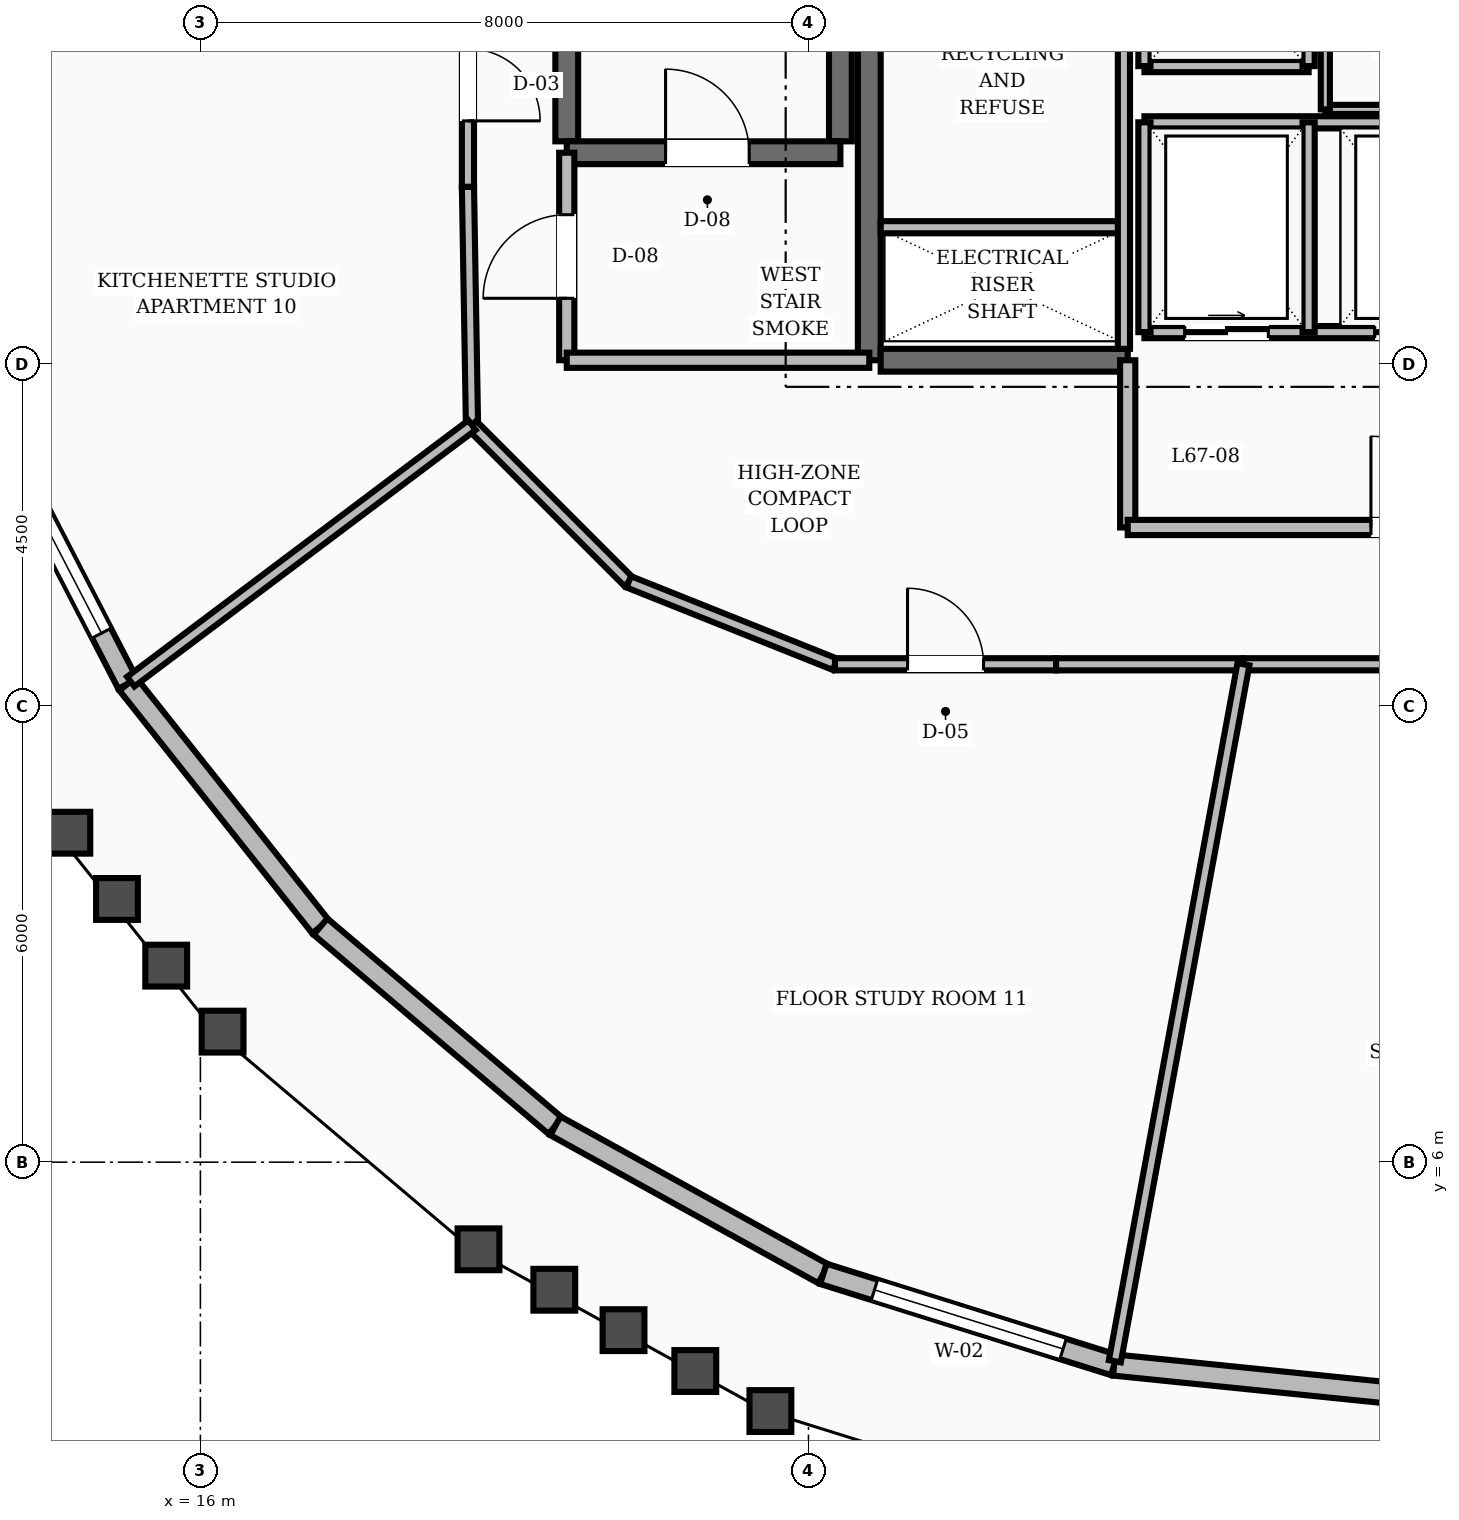
"""IFC4 building model, lengths in metres.
Left out: names, types, materials, properties, quantities, classifications, styles, units other than length and angle.
Written with IfcOpenShell. Run it as: python <this file> out.ifc"""

import sys

from ifc_helpers import new_model, si_unit, direction, frame, frame_2d, origin, place, context, subcontext, project, spatial, rectangle, extrude, element, fill, save


model = new_model("IFC4")
c1 = context("Model", 3, precision=1e-05, world=origin(), true_north=direction((0.0, 1.0)))
c2 = subcontext(c1, "Body", "Model", "MODEL_VIEW")
j1 = project(units=[si_unit("LENGTHUNIT", "METRE"), si_unit("PLANEANGLEUNIT", "RADIAN")], contexts=[c1])
p1 = place(None, origin())
s1 = spatial("IfcSite", under=j1, at=p1, CompositionType="ELEMENT")
p2 = place(p1, origin())
s2 = spatial("IfcBuilding", under=s1, at=p2, CompositionType="ELEMENT")
p3 = place(p2, frame((0.0, 0.0, 258.0)))
s3 = spatial("IfcBuildingStorey", under=s2, at=p3, CompositionType="ELEMENT", Elevation=258.0)
p4 = place(p3, frame((24.8, 16.55, 0.0), z_axis=(0.0, 0.0, 1.0), x_axis=(0.0, 1.0, 0.0)))
e1 = element("IfcWall", 1, at=p4, inside=s3, PredefinedType="SHEAR", context=c2, shape_type="SweptSolid", body=[
    extrude(rectangle(XDim=6.3, YDim=0.3, at=frame_2d((3.15, 0.0))), origin(), (0.0, 0.0, 1.0), 3.6),
])
p5 = place(p3, frame((24.95, 16.55, 0.0), z_axis=(0.0, 0.0, 1.0), x_axis=(1.0, 0.0, 0.0)))
e2 = element("IfcWall", 2, at=p5, inside=s3, PredefinedType="SHEAR", context=c2, shape_type="SweptSolid", body=[
    extrude(rectangle(XDim=3.25, YDim=0.3, at=frame_2d((1.625, 0.0))), origin(), (0.0, 0.0, 1.0), 3.6),
])
for number, where, z_axis, x_axis in (
    (3, (20.82, 19.43, 0.0), (0.0, 0.0, 1.0), (0.0, 1.0, 0.0)),
    (4, (24.42, 19.43, 0.0), (0.0, 0.0, 1.0), (0.0, 1.0, 0.0)),
):
    element("IfcWall", number, at=place(p3, frame(where, z_axis=z_axis, x_axis=x_axis)), inside=s3, PredefinedType="SHEAR", context=c2, shape_type="SweptSolid", body=[
        extrude(rectangle(XDim=8.74, YDim=0.3, at=frame_2d((4.37, 0.0))), origin(), (0.0, 0.0, 1.0), 3.6),
    ])
p6 = place(p3, frame((20.82, 19.28, 0.0), z_axis=(0.0, 0.0, 1.0), x_axis=(1.0, 0.0, 0.0)))
e5 = element("IfcWall", 5, at=p6, inside=s3, PredefinedType="SHEAR", context=c2, shape_type="SweptSolid", body=[
    extrude(rectangle(XDim=3.6, YDim=0.3, at=frame_2d((1.8, 0.0))), origin(), (0.0, 0.0, 1.0), 3.6),
])
p7 = place(p6, frame((1.3, 0.0, 0.0)))
e6 = element("IfcOpeningElement", 6, at=p7, cuts=e5, PredefinedType="OPENING", context=c2, shape_type="SweptSolid", body=[
    extrude(rectangle(XDim=1.1, YDim=2.1, at=frame_2d((0.55, 1.05))), frame((0.0, 0.16, 0.0), z_axis=(0.0, -1.0, 0.0), x_axis=(1.0, 0.0, 0.0)), (0.0, 0.0, 1.0), 0.32),
])
p8 = place(p3, frame((13.159, 15.936, 0.0), z_axis=(0.0, 0.0, 1.0), x_axis=(0.459432634071, -0.888212617987, 0.0)))
e7 = element("IfcWall", 7, at=p8, inside=s3, PredefinedType="STANDARD", context=c2, shape_type="SweptSolid", body=[
    extrude(rectangle(XDim=4.102, YDim=0.28, at=frame_2d((2.051, 0.0))), origin(), (0.0, 0.0, 1.0), 2.88),
])
p9 = place(p8, frame((0.751, 0.0, 0.8)))
e8 = element("IfcOpeningElement", 8, at=p9, cuts=e7, PredefinedType="OPENING", context=c2, shape_type="SweptSolid", body=[
    extrude(rectangle(XDim=2.6, YDim=1.65, at=frame_2d((1.3, 0.825))), frame((0.0, 0.15, 0.0), z_axis=(0.0, -1.0, 0.0), x_axis=(1.0, 0.0, 0.0)), (0.0, 0.0, 1.0), 0.3),
])
p10 = place(p3, frame((15.044, 12.292, 0.0), z_axis=(0.0, 0.0, 1.0), x_axis=(0.621916698547, -0.783083405563, 0.0)))
e9 = element("IfcWall", 9, at=p10, inside=s3, PredefinedType="STANDARD", context=c2, shape_type="SweptSolid", body=[
    extrude(rectangle(XDim=4.078, YDim=0.28, at=frame_2d((2.039, 0.0))), origin(), (0.0, 0.0, 1.0), 2.88),
])
p11 = place(p3, frame((17.58, 9.099, 0.0), z_axis=(0.0, 0.0, 1.0), x_axis=(0.762691056528, -0.646762979995, 0.0)))
e10 = element("IfcWall", 10, at=p11, inside=s3, PredefinedType="STANDARD", context=c2, shape_type="SweptSolid", body=[
    extrude(rectangle(XDim=4.052, YDim=0.28, at=frame_2d((2.026, 0.0))), origin(), (0.0, 0.0, 1.0), 2.88),
])
p12 = place(p3, frame((20.67, 6.478, 0.0), z_axis=(0.0, 0.0, 1.0), x_axis=(0.875332682679, -0.483521141869, 0.0)))
e11 = element("IfcWall", 11, at=p12, inside=s3, PredefinedType="STANDARD", context=c2, shape_type="SweptSolid", body=[
    extrude(rectangle(XDim=4.028, YDim=0.28, at=frame_2d((2.014, 0.0))), origin(), (0.0, 0.0, 1.0), 2.88),
])
p13 = place(p3, frame((24.196, 4.531, 0.0), z_axis=(0.0, 0.0, 1.0), x_axis=(0.954211945644, -0.299131347055, 0.0)))
e12 = element("IfcWall", 12, at=p13, inside=s3, PredefinedType="STANDARD", context=c2, shape_type="SweptSolid", body=[
    extrude(rectangle(XDim=4.009, YDim=0.28, at=frame_2d((2.004, 0.0))), origin(), (0.0, 0.0, 1.0), 2.88),
])
p14 = place(p13, frame((0.705, 0.0, 0.8)))
e13 = element("IfcOpeningElement", 13, at=p14, cuts=e12, PredefinedType="OPENING", context=c2, shape_type="SweptSolid", body=[
    extrude(rectangle(XDim=2.6, YDim=1.65, at=frame_2d((1.3, 0.825))), frame((0.0, 0.15, 0.0), z_axis=(0.0, -1.0, 0.0), x_axis=(1.0, 0.0, 0.0)), (0.0, 0.0, 1.0), 0.3),
])
p15 = place(p3, frame((28.021, 3.332, 0.0), z_axis=(0.0, 0.0, 1.0), x_axis=(0.99486404525, -0.101220212753, 0.0)))
e14 = element("IfcWall", 14, at=p15, inside=s3, PredefinedType="STANDARD", context=c2, shape_type="SweptSolid", body=[
    extrude(rectangle(XDim=3.999, YDim=0.28, at=frame_2d((2.0, 0.0))), origin(), (0.0, 0.0, 1.0), 2.88),
])
p16 = place(p3, frame((20.82, 16.55, 0.0), z_axis=(0.0, 0.0, 1.0), x_axis=(0.0, 1.0, 0.0)))
e15 = element("IfcWall", 15, at=p16, inside=s3, PredefinedType="SOLIDWALL", context=c2, shape_type="SweptSolid", body=[
    extrude(rectangle(XDim=2.73, YDim=0.2, at=frame_2d((1.365, 0.0))), origin(), (0.0, 0.0, 1.0), 2.87),
])
p17 = place(p16, frame((0.815, 0.0, 0.0)))
e16 = element("IfcOpeningElement", 16, at=p17, cuts=e15, PredefinedType="OPENING", context=c2, shape_type="SweptSolid", body=[
    extrude(rectangle(XDim=1.1, YDim=2.1, at=frame_2d((0.55, 1.05))), frame((0.0, 0.11, 0.0), z_axis=(0.0, -1.0, 0.0), x_axis=(1.0, 0.0, 0.0)), (0.0, 0.0, 1.0), 0.22),
])
p18 = place(p3, frame((20.82, 16.55, 0.0), z_axis=(0.0, 0.0, 1.0), x_axis=(1.0, 0.0, 0.0)))
e17 = element("IfcWall", 17, at=p18, inside=s3, PredefinedType="SOLIDWALL", context=c2, shape_type="SweptSolid", body=[
    extrude(rectangle(XDim=3.98, YDim=0.2, at=frame_2d((1.99, 0.0))), origin(), (0.0, 0.0, 1.0), 2.87),
])
p19 = place(p3, frame((28.2, 14.35, 0.0), z_axis=(0.0, 0.0, 1.0), x_axis=(0.0, 1.0, 0.0)))
e18 = element("IfcWall", 18, at=p19, inside=s3, PredefinedType="SOLIDWALL", context=c2, shape_type="SweptSolid", body=[
    extrude(rectangle(XDim=2.2, YDim=0.2, at=frame_2d((1.1, 0.0))), origin(), (0.0, 0.0, 1.0), 2.87),
])
p20 = place(p3, frame((28.2, 14.35, 0.0), z_axis=(0.0, 0.0, 1.0), x_axis=(1.0, 0.0, 0.0)))
e19 = element("IfcWall", 19, at=p20, inside=s3, PredefinedType="SOLIDWALL", context=c2, shape_type="SweptSolid", body=[
    extrude(rectangle(XDim=7.6, YDim=0.2, at=frame_2d((3.8, 0.0))), origin(), (0.0, 0.0, 1.0), 2.87),
])
p21 = place(p20, frame((3.2, 0.0, 0.0)))
e20 = element("IfcOpeningElement", 20, at=p21, cuts=e19, PredefinedType="OPENING", context=c2, shape_type="SweptSolid", body=[
    extrude(rectangle(XDim=1.2, YDim=2.1, at=frame_2d((0.6, 1.05))), frame((0.0, 0.11, 0.0), z_axis=(0.0, -1.0, 0.0), x_axis=(1.0, 0.0, 0.0)), (0.0, 0.0, 1.0), 0.22),
])
for number, where, z_axis, x_axis in (
    (21, (28.42, 20.42, 0.0), (0.0, 0.0, 1.0), (1.0, 0.0, 0.0)),
    (22, (28.42, 20.42, 0.0), (0.0, 0.0, 1.0), (0.0, 1.0, 0.0)),
    (23, (30.58, 20.42, 0.0), (0.0, 0.0, 1.0), (0.0, 1.0, 0.0)),
):
    element("IfcWall", number, at=place(p3, frame(where, z_axis=z_axis, x_axis=x_axis)), inside=s3, PredefinedType="SOLIDWALL", context=c2, shape_type="SweptSolid", body=[
        extrude(rectangle(XDim=2.16, YDim=0.16, at=frame_2d((1.08, 0.0))), origin(), (0.0, 0.0, 1.0), 2.87),
    ])
p22 = place(p3, frame((28.42, 16.92, 0.0), z_axis=(0.0, 0.0, 1.0), x_axis=(1.0, 0.0, 0.0)))
e24 = element("IfcWall", 24, at=p22, inside=s3, PredefinedType="SOLIDWALL", context=c2, shape_type="SweptSolid", body=[
    extrude(rectangle(XDim=7.16, YDim=0.16, at=frame_2d((3.58, 0.0))), origin(), (0.0, 0.0, 1.0), 2.87),
])
p23 = place(p22, frame((0.53, 0.0, 0.0)))
e25 = element("IfcOpeningElement", 25, at=p23, cuts=e24, PredefinedType="OPENING", context=c2, shape_type="SweptSolid", body=[
    extrude(rectangle(XDim=1.1, YDim=2.15, at=frame_2d((0.55, 1.075))), frame((0.0, 0.09, 0.0), z_axis=(0.0, -1.0, 0.0), x_axis=(1.0, 0.0, 0.0)), (0.0, 0.0, 1.0), 0.18),
])
p24 = place(p22, frame((3.03, 0.0, 0.0)))
e26 = element("IfcOpeningElement", 26, at=p24, cuts=e24, PredefinedType="OPENING", context=c2, shape_type="SweptSolid", body=[
    extrude(rectangle(XDim=1.1, YDim=2.15, at=frame_2d((0.55, 1.075))), frame((0.0, 0.09, 0.0), z_axis=(0.0, -1.0, 0.0), x_axis=(1.0, 0.0, 0.0)), (0.0, 0.0, 1.0), 0.18),
])
p25 = place(p22, frame((5.53, 0.0, 0.0)))
e27 = element("IfcOpeningElement", 27, at=p25, cuts=e24, PredefinedType="OPENING", context=c2, shape_type="SweptSolid", body=[
    extrude(rectangle(XDim=1.1, YDim=2.15, at=frame_2d((0.55, 1.075))), frame((0.0, 0.09, 0.0), z_axis=(0.0, -1.0, 0.0), x_axis=(1.0, 0.0, 0.0)), (0.0, 0.0, 1.0), 0.18),
])
p26 = place(p3, frame((28.42, 19.68, 0.0), z_axis=(0.0, 0.0, 1.0), x_axis=(1.0, 0.0, 0.0)))
e28 = element("IfcWall", 28, at=p26, inside=s3, PredefinedType="SOLIDWALL", context=c2, shape_type="SweptSolid", body=[
    extrude(rectangle(XDim=7.16, YDim=0.16, at=frame_2d((3.58, 0.0))), origin(), (0.0, 0.0, 1.0), 2.87),
])
for number, where, z_axis, x_axis in (
    (29, (28.42, 16.92, 0.0), (0.0, 0.0, 1.0), (0.0, 1.0, 0.0)),
    (30, (30.58, 16.92, 0.0), (0.0, 0.0, 1.0), (0.0, 1.0, 0.0)),
):
    element("IfcWall", number, at=place(p3, frame(where, z_axis=z_axis, x_axis=x_axis)), inside=s3, PredefinedType="SOLIDWALL", context=c2, shape_type="SweptSolid", body=[
        extrude(rectangle(XDim=2.76, YDim=0.16, at=frame_2d((1.38, 0.0))), origin(), (0.0, 0.0, 1.0), 2.87),
    ])
p27 = place(p3, frame((30.8, 19.85, 0.0), z_axis=(0.0, 0.0, 1.0), x_axis=(1.0, 0.0, 0.0)))
e31 = element("IfcWall", 31, at=p27, inside=s3, PredefinedType="PARTITIONING", context=c2, shape_type="SweptSolid", body=[
    extrude(rectangle(XDim=4.95, YDim=0.12, at=frame_2d((2.475, 0.0))), origin(), (0.0, 0.0, 1.0), 2.87),
])
p28 = place(p3, frame((30.8, 19.85, 0.0), z_axis=(0.0, 0.0, 1.0), x_axis=(0.0, 1.0, 0.0)))
e32 = element("IfcWall", 32, at=p28, inside=s3, PredefinedType="PARTITIONING", context=c2, shape_type="SweptSolid", body=[
    extrude(rectangle(XDim=2.83, YDim=0.12, at=frame_2d((1.415, 0.0))), origin(), (0.0, 0.0, 1.0), 2.87),
])
p29 = place(p3, frame((24.95, 18.3, 0.0), z_axis=(0.0, 0.0, 1.0), x_axis=(1.0, 0.0, 0.0)))
e33 = element("IfcWall", 33, at=p29, inside=s3, PredefinedType="SOLIDWALL", context=c2, shape_type="SweptSolid", body=[
    extrude(rectangle(XDim=3.2, YDim=0.16, at=frame_2d((1.6, 0.0))), origin(), (0.0, 0.0, 1.0), 2.87),
])
p30 = place(p3, frame((28.15, 16.7, 0.0), z_axis=(0.0, 0.0, 1.0), x_axis=(0.0, 1.0, 0.0)))
e34 = element("IfcWall", 34, at=p30, inside=s3, PredefinedType="SOLIDWALL", context=c2, shape_type="SweptSolid", body=[
    extrude(rectangle(XDim=6.05, YDim=0.16, at=frame_2d((3.025, 0.0))), origin(), (0.0, 0.0, 1.0), 2.87),
])
p31 = place(p3, frame((19.52, 21.518, 0.0), z_axis=(0.0, 0.0, 1.0), x_axis=(0.0, -1.0, 0.0)))
e35 = element("IfcWall", 35, at=p31, inside=s3, PredefinedType="SOLIDWALL", context=c2, shape_type="SweptSolid", body=[
    extrude(rectangle(XDim=2.687, YDim=0.16, at=frame_2d((1.344, 0.0))), origin(), (0.0, 0.0, 1.0), 2.87),
])
p32 = place(p31, frame((0.868, 0.0, 0.0)))
e36 = element("IfcOpeningElement", 36, at=p32, cuts=e35, PredefinedType="OPENING", context=c2, shape_type="SweptSolid", body=[
    extrude(rectangle(XDim=0.95, YDim=2.1, at=frame_2d((0.475, 1.05))), frame((0.0, 0.09, 0.0), z_axis=(0.0, -1.0, 0.0), x_axis=(1.0, 0.0, 0.0)), (0.0, 0.0, 1.0), 0.18),
])
p33 = place(p3, frame((19.52, 18.831, 0.0), z_axis=(0.0, 0.0, 1.0), x_axis=(0.016981035134, -0.999855811828, 0.0)))
e37 = element("IfcWall", 37, at=p33, inside=s3, PredefinedType="SOLIDWALL", context=c2, shape_type="SweptSolid", body=[
    extrude(rectangle(XDim=3.134, YDim=0.16, at=frame_2d((1.567, 0.0))), origin(), (0.0, 0.0, 1.0), 2.87),
])
p34 = place(p3, frame((19.573, 15.697, 0.0), z_axis=(0.0, 0.0, 1.0), x_axis=(0.707106781187, -0.707106781187, 0.0)))
e38 = element("IfcWall", 38, at=p34, inside=s3, PredefinedType="SOLIDWALL", context=c2, shape_type="SweptSolid", body=[
    extrude(rectangle(XDim=2.916, YDim=0.16, at=frame_2d((1.458, 0.0))), origin(), (0.0, 0.0, 1.0), 2.87),
])
p35 = place(p3, frame((21.635, 13.635, 0.0), z_axis=(0.0, 0.0, 1.0), x_axis=(0.92856882165, -0.371160266542, 0.0)))
e39 = element("IfcWall", 39, at=p35, inside=s3, PredefinedType="SOLIDWALL", context=c2, shape_type="SweptSolid", body=[
    extrude(rectangle(XDim=2.923, YDim=0.16, at=frame_2d((1.461, 0.0))), origin(), (0.0, 0.0, 1.0), 2.87),
])
p36 = place(p3, frame((24.349, 12.55, 0.0), z_axis=(0.0, 0.0, 1.0), x_axis=(1.0, 0.0, 0.0)))
e40 = element("IfcWall", 40, at=p36, inside=s3, PredefinedType="SOLIDWALL", context=c2, shape_type="SweptSolid", body=[
    extrude(rectangle(XDim=2.908, YDim=0.16, at=frame_2d((1.454, 0.0))), origin(), (0.0, 0.0, 1.0), 2.87),
])
p37 = place(p36, frame((0.954, 0.0, 0.0)))
e41 = element("IfcOpeningElement", 41, at=p37, cuts=e40, PredefinedType="OPENING", context=c2, shape_type="SweptSolid", body=[
    extrude(rectangle(XDim=1.0, YDim=2.1, at=frame_2d((0.5, 1.05))), frame((0.0, 0.09, 0.0), z_axis=(0.0, -1.0, 0.0), x_axis=(1.0, 0.0, 0.0)), (0.0, 0.0, 1.0), 0.18),
])
p38 = place(p3, frame((27.257, 12.55, 0.0), z_axis=(0.0, 0.0, 1.0), x_axis=(1.0, 0.0, 0.0)))
e42 = element("IfcWall", 42, at=p38, inside=s3, PredefinedType="SOLIDWALL", context=c2, shape_type="SweptSolid", body=[
    extrude(rectangle(XDim=2.465, YDim=0.16, at=frame_2d((1.232, 0.0))), origin(), (0.0, 0.0, 1.0), 2.87),
])
p39 = place(p3, frame((29.722, 12.55, 0.0), z_axis=(0.0, 0.0, 1.0), x_axis=(1.0, 0.0, 0.0)))
e43 = element("IfcWall", 43, at=p39, inside=s3, PredefinedType="SOLIDWALL", context=c2, shape_type="SweptSolid", body=[
    extrude(rectangle(XDim=2.278, YDim=0.16, at=frame_2d((1.139, 0.0))), origin(), (0.0, 0.0, 1.0), 2.87),
])
p40 = place(p3, frame((19.573, 15.697, 0.0), z_axis=(0.0, 0.0, 1.0), x_axis=(-0.799352680188, -0.600862124514, 0.0)))
e44 = element("IfcWall", 44, at=p40, inside=s3, PredefinedType="SOLIDWALL", context=c2, shape_type="SweptSolid", body=[
    extrude(rectangle(XDim=5.616, YDim=0.16, at=frame_2d((2.808, 0.0))), origin(), (0.0, 0.0, 1.0), 2.87),
])
p41 = place(p3, frame((29.722, 12.55, 0.0), z_axis=(0.0, 0.0, 1.0), x_axis=(-0.181431000309, -0.983403677096, 0.0)))
e45 = element("IfcWall", 45, at=p41, inside=s3, PredefinedType="SOLIDWALL", context=c2, shape_type="SweptSolid", body=[
    extrude(rectangle(XDim=9.324, YDim=0.16, at=frame_2d((4.662, 0.0))), origin(), (0.0, 0.0, 1.0), 2.87),
])
p42 = place(p9, origin())
e46 = element("IfcWindow", 46, at=p42, inside=s3, PartitioningType="SINGLE_PANEL", PredefinedType="WINDOW", context=c2, shape_type="SweptSolid", body=[
    extrude(rectangle(XDim=2.6, YDim=1.65, at=frame_2d((1.3, 0.825))), frame((0.0, 0.03, 0.0), z_axis=(0.0, -1.0, 0.0), x_axis=(1.0, 0.0, 0.0)), (0.0, 0.0, 1.0), 0.06),
])
fill(e8, e46)
p43 = place(p14, origin())
e47 = element("IfcWindow", 47, at=p43, inside=s3, PartitioningType="SINGLE_PANEL", PredefinedType="WINDOW", context=c2, shape_type="SweptSolid", body=[
    extrude(rectangle(XDim=2.6, YDim=1.65, at=frame_2d((1.3, 0.825))), frame((0.0, 0.03, 0.0), z_axis=(0.0, -1.0, 0.0), x_axis=(1.0, 0.0, 0.0)), (0.0, 0.0, 1.0), 0.06),
])
fill(e13, e47)
p44 = place(p7, origin())
e48 = element("IfcDoor", 48, at=p44, inside=s3, OperationType="SINGLE_SWING_LEFT", PredefinedType="DOOR", context=c2, shape_type="SweptSolid", body=[
    extrude(rectangle(XDim=1.1, YDim=2.1, at=frame_2d((0.55, 1.05))), frame((0.0, 0.025, 0.0), z_axis=(0.0, -1.0, 0.0), x_axis=(1.0, 0.0, 0.0)), (0.0, 0.0, 1.0), 0.05),
])
fill(e6, e48)
p45 = place(p17, origin())
e49 = element("IfcDoor", 49, at=p45, inside=s3, OperationType="SINGLE_SWING_LEFT", PredefinedType="DOOR", context=c2, shape_type="SweptSolid", body=[
    extrude(rectangle(XDim=1.1, YDim=2.1, at=frame_2d((0.55, 1.05))), frame((0.0, 0.025, 0.0), z_axis=(0.0, -1.0, 0.0), x_axis=(1.0, 0.0, 0.0)), (0.0, 0.0, 1.0), 0.05),
])
fill(e16, e49)
p46 = place(p21, origin())
e50 = element("IfcDoor", 50, at=p46, inside=s3, OperationType="SINGLE_SWING_LEFT", PredefinedType="DOOR", context=c2, shape_type="SweptSolid", body=[
    extrude(rectangle(XDim=1.2, YDim=2.1, at=frame_2d((0.6, 1.05))), frame((0.0, 0.025, 0.0), z_axis=(0.0, -1.0, 0.0), x_axis=(1.0, 0.0, 0.0)), (0.0, 0.0, 1.0), 0.05),
])
fill(e20, e50)
p47 = place(p23, origin())
e51 = element("IfcDoor", 51, at=p47, inside=s3, OperationType="SLIDING_TO_RIGHT", PredefinedType="DOOR", context=c2, shape_type="SweptSolid", body=[
    extrude(rectangle(XDim=1.1, YDim=2.15, at=frame_2d((0.55, 1.075))), frame((0.0, 0.025, 0.0), z_axis=(0.0, -1.0, 0.0), x_axis=(1.0, 0.0, 0.0)), (0.0, 0.0, 1.0), 0.05),
])
fill(e25, e51)
p48 = place(p24, origin())
e52 = element("IfcDoor", 52, at=p48, inside=s3, OperationType="SLIDING_TO_RIGHT", PredefinedType="DOOR", context=c2, shape_type="SweptSolid", body=[
    extrude(rectangle(XDim=1.1, YDim=2.15, at=frame_2d((0.55, 1.075))), frame((0.0, 0.025, 0.0), z_axis=(0.0, -1.0, 0.0), x_axis=(1.0, 0.0, 0.0)), (0.0, 0.0, 1.0), 0.05),
])
fill(e26, e52)
p49 = place(p32, origin())
e53 = element("IfcDoor", 53, at=p49, inside=s3, OperationType="SINGLE_SWING_RIGHT", PredefinedType="DOOR", context=c2, shape_type="SweptSolid", body=[
    extrude(rectangle(XDim=0.95, YDim=2.1, at=frame_2d((0.475, 1.05))), frame((0.0, 0.025, 0.0), z_axis=(0.0, -1.0, 0.0), x_axis=(1.0, 0.0, 0.0)), (0.0, 0.0, 1.0), 0.05),
])
fill(e36, e53)
p50 = place(p37, origin())
e54 = element("IfcDoor", 54, at=p50, inside=s3, OperationType="SINGLE_SWING_LEFT", PredefinedType="DOOR", context=c2, shape_type="SweptSolid", body=[
    extrude(rectangle(XDim=1.0, YDim=2.1, at=frame_2d((0.5, 1.05))), frame((0.0, 0.025, 0.0), z_axis=(0.0, -1.0, 0.0), x_axis=(1.0, 0.0, 0.0)), (0.0, 0.0, 1.0), 0.05),
])
fill(e41, e54)
save(model, sys.argv[1])
